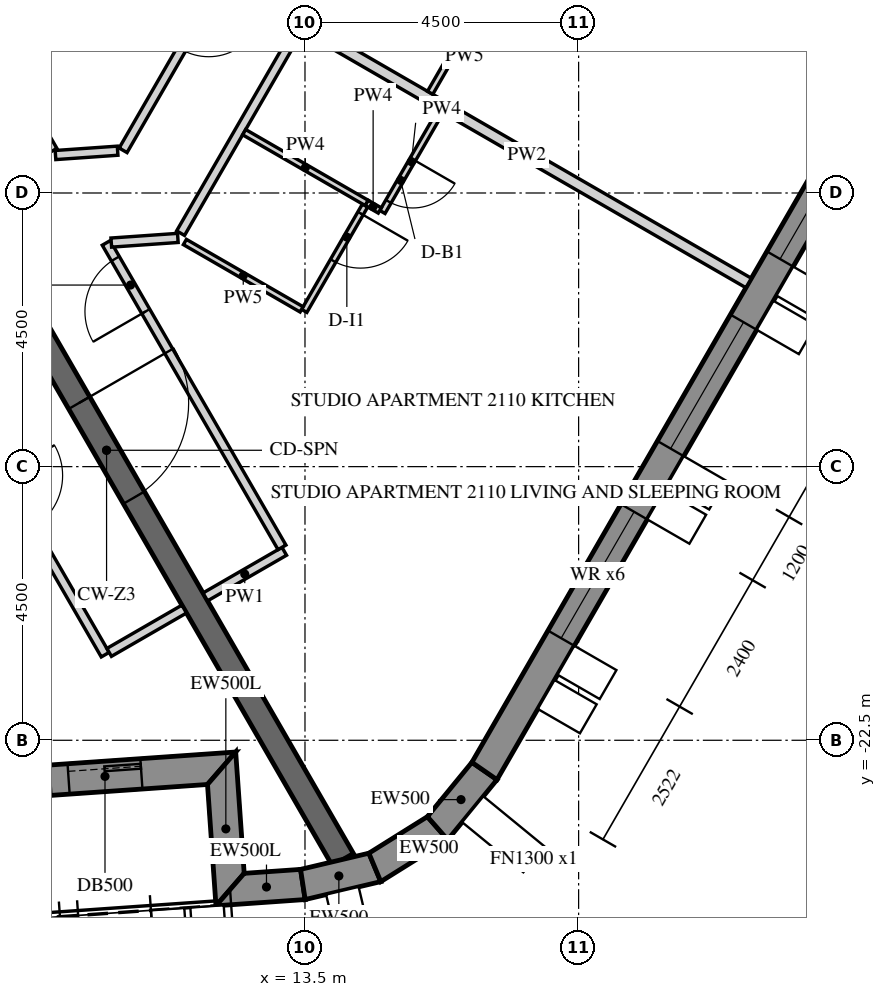
"""IFC4 building model, lengths in metres.
Left out: names, types, materials, properties, quantities, classifications, styles, units other than length and angle.
Written with IfcOpenShell. Run it as: python <this file> out.ifc"""

import sys

from ifc_helpers import new_model, si_unit, direction, frame, frame_2d, origin, place, context, subcontext, project, spatial, polyline, rectangle, outline, extrude, element, fill, save


model = new_model("IFC4")
c1 = context("Model", 3, precision=1e-05, world=origin(), true_north=direction((0.0, 1.0)))
c2 = subcontext(c1, "Body", "Model", "MODEL_VIEW")
j1 = project(units=[si_unit("LENGTHUNIT", "METRE"), si_unit("PLANEANGLEUNIT", "RADIAN")], contexts=[c1])
p1 = place(None, origin())
s1 = spatial("IfcSite", under=j1, at=p1, CompositionType="ELEMENT")
p2 = place(p1, origin())
s2 = spatial("IfcBuilding", under=s1, at=p2, CompositionType="ELEMENT")
p3 = place(p2, frame((0.0, 0.0, 267.9)))
s3 = spatial("IfcBuildingStorey", under=s2, at=p3, CompositionType="ELEMENT", Elevation=267.9)
p4 = place(p3, frame((-10.86, -24.567, -0.15), z_axis=(0.0, 0.0, 1.0), x_axis=(0.997564329317, 0.06975248292, 0.0)))
e1 = element("IfcWall", 1, at=p4, inside=s3, PredefinedType="SOLIDWALL", context=c2, shape_type="SweptSolid", body=[
    extrude(outline(polyline([(0.25, -0.25), (22.795, -0.25), (23.295, 0.25), (-0.25, 0.25), (0.25, -0.25)])), origin(), (0.0, 0.0, 1.0), 3.9),
])
p5 = place(p4, frame((1.323, 0.0, 1.05)))
e2 = element("IfcOpeningElement", 2, at=p5, cuts=e1, PredefinedType="OPENING", context=c2, shape_type="SweptSolid", body=[
    extrude(rectangle(XDim=0.9, YDim=1.5, at=frame_2d((0.45, 0.75))), frame((0.0, 0.26, 0.0), z_axis=(0.0, -1.0, 0.0), x_axis=(1.0, 0.0, 0.0)), (0.0, 0.0, 1.0), 0.52),
])
p6 = place(p4, frame((2.522, 0.0, 0.15)))
e3 = element("IfcOpeningElement", 3, at=p6, cuts=e1, PredefinedType="OPENING", context=c2, shape_type="SweptSolid", body=[
    extrude(rectangle(XDim=1.2, YDim=2.4, at=frame_2d((0.6, 1.2))), frame((0.0, 0.26, 0.0), z_axis=(0.0, -1.0, 0.0), x_axis=(1.0, 0.0, 0.0)), (0.0, 0.0, 1.0), 0.52),
])
p7 = place(p4, frame((4.922, 0.0, 1.05)))
e4 = element("IfcOpeningElement", 4, at=p7, cuts=e1, PredefinedType="OPENING", context=c2, shape_type="SweptSolid", body=[
    extrude(rectangle(XDim=0.9, YDim=1.5, at=frame_2d((0.45, 0.75))), frame((0.0, 0.26, 0.0), z_axis=(0.0, -1.0, 0.0), x_axis=(1.0, 0.0, 0.0)), (0.0, 0.0, 1.0), 0.52),
])
p8 = place(p4, frame((6.122, 0.0, 0.15)))
e5 = element("IfcOpeningElement", 5, at=p8, cuts=e1, PredefinedType="OPENING", context=c2, shape_type="SweptSolid", body=[
    extrude(rectangle(XDim=1.2, YDim=2.4, at=frame_2d((0.6, 1.2))), frame((0.0, 0.26, 0.0), z_axis=(0.0, -1.0, 0.0), x_axis=(1.0, 0.0, 0.0)), (0.0, 0.0, 1.0), 0.52),
])
p9 = place(p4, frame((8.522, 0.0, 1.05)))
e6 = element("IfcOpeningElement", 6, at=p9, cuts=e1, PredefinedType="OPENING", context=c2, shape_type="SweptSolid", body=[
    extrude(rectangle(XDim=0.9, YDim=1.5, at=frame_2d((0.45, 0.75))), frame((0.0, 0.26, 0.0), z_axis=(0.0, -1.0, 0.0), x_axis=(1.0, 0.0, 0.0)), (0.0, 0.0, 1.0), 0.52),
])
p10 = place(p4, frame((9.722, 0.0, 0.15)))
e7 = element("IfcOpeningElement", 7, at=p10, cuts=e1, PredefinedType="OPENING", context=c2, shape_type="SweptSolid", body=[
    extrude(rectangle(XDim=1.2, YDim=2.4, at=frame_2d((0.6, 1.2))), frame((0.0, 0.26, 0.0), z_axis=(0.0, -1.0, 0.0), x_axis=(1.0, 0.0, 0.0)), (0.0, 0.0, 1.0), 0.52),
])
p11 = place(p4, frame((12.122, 0.0, 1.05)))
e8 = element("IfcOpeningElement", 8, at=p11, cuts=e1, PredefinedType="OPENING", context=c2, shape_type="SweptSolid", body=[
    extrude(rectangle(XDim=0.9, YDim=1.5, at=frame_2d((0.45, 0.75))), frame((0.0, 0.26, 0.0), z_axis=(0.0, -1.0, 0.0), x_axis=(1.0, 0.0, 0.0)), (0.0, 0.0, 1.0), 0.52),
])
p12 = place(p4, frame((13.323, 0.0, 0.15)))
e9 = element("IfcOpeningElement", 9, at=p12, cuts=e1, PredefinedType="OPENING", context=c2, shape_type="SweptSolid", body=[
    extrude(rectangle(XDim=1.2, YDim=2.4, at=frame_2d((0.6, 1.2))), frame((0.0, 0.26, 0.0), z_axis=(0.0, -1.0, 0.0), x_axis=(1.0, 0.0, 0.0)), (0.0, 0.0, 1.0), 0.52),
])
p13 = place(p4, frame((15.722, 0.0, 1.05)))
e10 = element("IfcOpeningElement", 10, at=p13, cuts=e1, PredefinedType="OPENING", context=c2, shape_type="SweptSolid", body=[
    extrude(rectangle(XDim=0.9, YDim=1.5, at=frame_2d((0.45, 0.75))), frame((0.0, 0.26, 0.0), z_axis=(0.0, -1.0, 0.0), x_axis=(1.0, 0.0, 0.0)), (0.0, 0.0, 1.0), 0.52),
])
p14 = place(p4, frame((16.922, 0.0, 0.15)))
e11 = element("IfcOpeningElement", 11, at=p14, cuts=e1, PredefinedType="OPENING", context=c2, shape_type="SweptSolid", body=[
    extrude(rectangle(XDim=1.2, YDim=2.4, at=frame_2d((0.6, 1.2))), frame((0.0, 0.26, 0.0), z_axis=(0.0, -1.0, 0.0), x_axis=(1.0, 0.0, 0.0)), (0.0, 0.0, 1.0), 0.52),
])
p15 = place(p4, frame((19.323, 0.0, 1.05)))
e12 = element("IfcOpeningElement", 12, at=p15, cuts=e1, PredefinedType="OPENING", context=c2, shape_type="SweptSolid", body=[
    extrude(rectangle(XDim=0.9, YDim=1.5, at=frame_2d((0.45, 0.75))), frame((0.0, 0.26, 0.0), z_axis=(0.0, -1.0, 0.0), x_axis=(1.0, 0.0, 0.0)), (0.0, 0.0, 1.0), 0.52),
])
p16 = place(p4, frame((20.522, 0.0, 0.15)))
e13 = element("IfcOpeningElement", 13, at=p16, cuts=e1, PredefinedType="OPENING", context=c2, shape_type="SweptSolid", body=[
    extrude(rectangle(XDim=1.2, YDim=2.4, at=frame_2d((0.6, 1.2))), frame((0.0, 0.26, 0.0), z_axis=(0.0, -1.0, 0.0), x_axis=(1.0, 0.0, 0.0)), (0.0, 0.0, 1.0), 0.52),
])
p17 = place(p3, frame((12.129, -22.96, -0.15), z_axis=(0.0, 0.0, 1.0), x_axis=(0.069824268692, -0.99755930726, 0.0)))
e14 = element("IfcWall", 14, at=p17, inside=s3, PredefinedType="SOLIDWALL", context=c2, shape_type="SweptSolid", body=[
    extrude(outline(polyline([(0.25, -0.25), (2.25, -0.25), (1.75, 0.25), (-0.25, 0.25), (0.25, -0.25)])), origin(), (0.0, 0.0, 1.0), 3.9),
])
p18 = place(p3, frame((12.268, -24.955, -0.15), z_axis=(0.0, 0.0, 1.0), x_axis=(0.997561942506, 0.06978660948, 0.0)))
e15 = element("IfcWall", 15, at=p18, inside=s3, PredefinedType="SOLIDWALL", context=c2, shape_type="SweptSolid", body=[
    extrude(outline(polyline([(-0.25, -0.25), (1.22, -0.25), (1.179, 0.25), (0.25, 0.25), (-0.25, -0.25)])), origin(), (0.0, 0.0, 1.0), 3.9),
])
p19 = place(p3, frame((13.465, -24.871, -0.15), z_axis=(0.0, 0.0, 1.0), x_axis=(0.973044740285, 0.230616420501, 0.0)))
e16 = element("IfcWall", 16, at=p19, inside=s3, PredefinedType="SOLIDWALL", context=c2, shape_type="SweptSolid", body=[
    extrude(outline(polyline([(-0.021, -0.25), (1.257, -0.25), (1.175, 0.25), (0.021, 0.25), (-0.021, -0.25)])), origin(), (0.0, 0.0, 1.0), 3.9),
])
p20 = place(p3, frame((14.649, -24.591, -0.15), z_axis=(0.0, 0.0, 1.0), x_axis=(0.848054682072, 0.529908724419, 0.0)))
e17 = element("IfcWall", 17, at=p20, inside=s3, PredefinedType="SOLIDWALL", context=c2, shape_type="SweptSolid", body=[
    extrude(outline(polyline([(-0.041, -0.25), (1.257, -0.25), (1.175, 0.25), (0.041, 0.25), (-0.041, -0.25)])), origin(), (0.0, 0.0, 1.0), 3.9),
])
p21 = place(p3, frame((15.68, -23.946, -0.15), z_axis=(0.0, 0.0, 1.0), x_axis=(0.633805934167, 0.773492105852, 0.0)))
e18 = element("IfcWall", 18, at=p21, inside=s3, PredefinedType="SOLIDWALL", context=c2, shape_type="SweptSolid", body=[
    extrude(outline(polyline([(-0.041, -0.25), (1.237, -0.25), (1.196, 0.25), (0.041, 0.25), (-0.041, -0.25)])), origin(), (0.0, 0.0, 1.0), 3.9),
])
p22 = place(p3, frame((16.451, -23.005, -0.15), z_axis=(0.0, 0.0, 1.0), x_axis=(0.500003737743, 0.866023245787, 0.0)))
e19 = element("IfcWall", 19, at=p22, inside=s3, PredefinedType="SOLIDWALL", context=c2, shape_type="SweptSolid", body=[
    extrude(outline(polyline([(-0.021, -0.25), (25.468, -0.25), (25.421, 0.25), (0.021, 0.25), (-0.021, -0.25)])), origin(), (0.0, 0.0, 1.0), 3.9),
])
p23 = place(p22, frame((2.522, 0.0, 0.75)))
e20 = element("IfcOpeningElement", 20, at=p23, cuts=e19, PredefinedType="OPENING", context=c2, shape_type="SweptSolid", body=[
    extrude(rectangle(XDim=2.4, YDim=2.7, at=frame_2d((1.2, 1.35))), frame((0.0, 0.26, 0.0), z_axis=(0.0, -1.0, 0.0), x_axis=(1.0, 0.0, 0.0)), (0.0, 0.0, 1.0), 0.52),
])
p24 = place(p22, frame((6.122, 0.0, 0.75)))
e21 = element("IfcOpeningElement", 21, at=p24, cuts=e19, PredefinedType="OPENING", context=c2, shape_type="SweptSolid", body=[
    extrude(rectangle(XDim=2.4, YDim=2.7, at=frame_2d((1.2, 1.35))), frame((0.0, 0.26, 0.0), z_axis=(0.0, -1.0, 0.0), x_axis=(1.0, 0.0, 0.0)), (0.0, 0.0, 1.0), 0.52),
])
p25 = place(p22, frame((9.722, 0.0, 0.75)))
e22 = element("IfcOpeningElement", 22, at=p25, cuts=e19, PredefinedType="OPENING", context=c2, shape_type="SweptSolid", body=[
    extrude(rectangle(XDim=2.4, YDim=2.7, at=frame_2d((1.2, 1.35))), frame((0.0, 0.26, 0.0), z_axis=(0.0, -1.0, 0.0), x_axis=(1.0, 0.0, 0.0)), (0.0, 0.0, 1.0), 0.52),
])
p26 = place(p22, frame((13.323, 0.0, 0.75)))
e23 = element("IfcOpeningElement", 23, at=p26, cuts=e19, PredefinedType="OPENING", context=c2, shape_type="SweptSolid", body=[
    extrude(rectangle(XDim=2.4, YDim=2.7, at=frame_2d((1.2, 1.35))), frame((0.0, 0.26, 0.0), z_axis=(0.0, -1.0, 0.0), x_axis=(1.0, 0.0, 0.0)), (0.0, 0.0, 1.0), 0.52),
])
p27 = place(p22, frame((16.922, 0.0, 0.75)))
e24 = element("IfcOpeningElement", 24, at=p27, cuts=e19, PredefinedType="OPENING", context=c2, shape_type="SweptSolid", body=[
    extrude(rectangle(XDim=2.4, YDim=2.7, at=frame_2d((1.2, 1.35))), frame((0.0, 0.26, 0.0), z_axis=(0.0, -1.0, 0.0), x_axis=(1.0, 0.0, 0.0)), (0.0, 0.0, 1.0), 0.52),
])
p28 = place(p22, frame((20.522, 0.0, 0.75)))
e25 = element("IfcOpeningElement", 25, at=p28, cuts=e19, PredefinedType="OPENING", context=c2, shape_type="SweptSolid", body=[
    extrude(rectangle(XDim=2.4, YDim=2.7, at=frame_2d((1.2, 1.35))), frame((0.0, 0.26, 0.0), z_axis=(0.0, -1.0, 0.0), x_axis=(1.0, 0.0, 0.0)), (0.0, 0.0, 1.0), 0.52),
])
p29 = place(p3, frame((6.351, -11.0, -0.15), z_axis=(0.0, 0.0, 1.0), x_axis=(0.499998894578, -0.866026041999, 0.0)))
e26 = element("IfcWall", 26, at=p29, inside=s3, PredefinedType="SHEAR", context=c2, shape_type="SweptSolid", body=[
    extrude(rectangle(XDim=15.544, YDim=0.4, at=frame_2d((7.772, 0.0))), origin(), (0.0, 0.0, 1.0), 3.9),
])
p30 = place(p29, frame((6.872, 0.0, 0.15)))
e27 = element("IfcOpeningElement", 27, at=p30, cuts=e26, PredefinedType="OPENING", context=c2, shape_type="SweptSolid", body=[
    extrude(rectangle(XDim=1.8, YDim=2.4, at=frame_2d((0.9, 1.2))), frame((0.0, 0.21, 0.0), z_axis=(0.0, -1.0, 0.0), x_axis=(1.0, 0.0, 0.0)), (0.0, 0.0, 1.0), 0.42),
])
p31 = place(p3, frame((6.5, -14.657, 0.0), z_axis=(0.0, 0.0, 1.0), x_axis=(0.499966098742, -0.8660449758, 0.0)))
e28 = element("IfcWall", 28, at=p31, inside=s3, PredefinedType="PARTITIONING", context=c2, shape_type="SweptSolid", body=[
    extrude(rectangle(XDim=7.431, YDim=0.15, at=frame_2d((3.715, 0.0))), origin(), (0.0, 0.0, 1.0), 2.988),
])
p32 = place(p31, frame((4.03, 0.0, 0.0)))
e29 = element("IfcOpeningElement", 29, at=p32, cuts=e28, PredefinedType="OPENING", context=c2, shape_type="SweptSolid", body=[
    extrude(rectangle(XDim=1.0, YDim=2.1, at=frame_2d((0.5, 1.05))), frame((0.0, 0.085, 0.0), z_axis=(0.0, -1.0, 0.0), x_axis=(1.0, 0.0, 0.0)), (0.0, 0.0, 1.0), 0.17),
])
p33 = place(p3, frame((10.28, -21.055, 0.0), z_axis=(0.0, 0.0, 1.0), x_axis=(0.866020080793, 0.500009219579, 0.0)))
e30 = element("IfcWall", 30, at=p33, inside=s3, PredefinedType="PARTITIONING", context=c2, shape_type="SweptSolid", body=[
    extrude(rectangle(XDim=1.425, YDim=0.15, at=frame_2d((0.712, 0.0))), origin(), (0.0, 0.0, 1.0), 2.988),
])
p34 = place(p3, frame((11.86, -20.142, 0.0), z_axis=(0.0, 0.0, 1.0), x_axis=(0.866031096941, 0.499990139034, 0.0)))
e31 = element("IfcWall", 31, at=p34, inside=s3, PredefinedType="PARTITIONING", context=c2, shape_type="SweptSolid", body=[
    extrude(rectangle(XDim=1.5, YDim=0.15, at=frame_2d((0.75, 0.0))), origin(), (0.0, 0.0, 1.0), 2.988),
])
p35 = place(p3, frame((13.122, -19.327, 0.0), z_axis=(0.0, 0.0, 1.0), x_axis=(-0.500013707032, 0.866017489881, 0.0)))
e32 = element("IfcWall", 32, at=p35, inside=s3, PredefinedType="PARTITIONING", context=c2, shape_type="SweptSolid", body=[
    extrude(rectangle(XDim=5.781, YDim=0.15, at=frame_2d((2.89, 0.0))), origin(), (0.0, 0.0, 1.0), 2.988),
])
p36 = place(p35, frame((4.481, 0.0, 0.0)))
e33 = element("IfcOpeningElement", 33, at=p36, cuts=e32, PredefinedType="OPENING", context=c2, shape_type="SweptSolid", body=[
    extrude(rectangle(XDim=1.0, YDim=2.1, at=frame_2d((0.5, 1.05))), frame((0.0, 0.085, 0.0), z_axis=(0.0, -1.0, 0.0), x_axis=(1.0, 0.0, 0.0)), (0.0, 0.0, 1.0), 0.17),
])
p37 = place(p3, frame((10.314, -14.315, 0.0), z_axis=(0.0, 0.0, 1.0), x_axis=(0.997557107149, 0.069855693944, 0.0)))
e34 = element("IfcWall", 34, at=p37, inside=s3, PredefinedType="PARTITIONING", context=c2, shape_type="SweptSolid", body=[
    extrude(rectangle(XDim=1.097, YDim=0.15, at=frame_2d((0.549, 0.0))), origin(), (0.0, 0.0, 1.0), 2.988),
])
p38 = place(p3, frame((11.454, -14.16, 0.0), z_axis=(0.0, 0.0, 1.0), x_axis=(0.500000296604, 0.86602523254, 0.0)))
e35 = element("IfcWall", 35, at=p38, inside=s3, PredefinedType="PARTITIONING", context=c2, shape_type="SweptSolid", body=[
    extrude(rectangle(XDim=14.934, YDim=0.15, at=frame_2d((7.467, 0.0))), origin(), (0.0, 0.0, 1.0), 2.988),
])
p39 = place(p38, frame((7.261, 0.0, 0.0)))
e36 = element("IfcOpeningElement", 36, at=p39, cuts=e35, PredefinedType="OPENING", context=c2, shape_type="SweptSolid", body=[
    extrude(rectangle(XDim=1.0, YDim=2.1, at=frame_2d((0.5, 1.05))), frame((0.0, 0.085, 0.0), z_axis=(0.0, -1.0, 0.0), x_axis=(1.0, 0.0, 0.0)), (0.0, 0.0, 1.0), 0.17),
])
p40 = place(p38, frame((13.784, 0.0, 0.0)))
e37 = element("IfcOpeningElement", 37, at=p40, cuts=e35, PredefinedType="OPENING", context=c2, shape_type="SweptSolid", body=[
    extrude(rectangle(XDim=1.0, YDim=2.1, at=frame_2d((0.5, 1.05))), frame((0.0, 0.085, 0.0), z_axis=(0.0, -1.0, 0.0), x_axis=(1.0, 0.0, 0.0)), (0.0, 0.0, 1.0), 0.17),
])
p41 = place(p3, frame((12.875, -8.699, 0.0), z_axis=(0.0, 0.0, 1.0), x_axis=(-0.49999482868, -0.866028389427, 0.0)))
e38 = element("IfcWall", 38, at=p41, inside=s3, PredefinedType="PARTITIONING", context=c2, shape_type="SweptSolid", body=[
    extrude(rectangle(XDim=4.733, YDim=0.15, at=frame_2d((2.366, 0.0))), origin(), (0.0, 0.0, 1.0), 2.988),
])
p42 = place(p41, frame((1.917, 0.0, 0.0)))
e39 = element("IfcOpeningElement", 39, at=p42, cuts=e38, PredefinedType="OPENING", context=c2, shape_type="SweptSolid", body=[
    extrude(rectangle(XDim=0.9, YDim=2.1, at=frame_2d((0.45, 1.05))), frame((0.0, 0.085, 0.0), z_axis=(0.0, -1.0, 0.0), x_axis=(1.0, 0.0, 0.0)), (0.0, 0.0, 1.0), 0.17),
])
p43 = place(p3, frame((10.419, -12.804, 0.0), z_axis=(0.0, 0.0, 1.0), x_axis=(-0.997558136861, -0.069840987838, 0.0)))
e40 = element("IfcWall", 40, at=p43, inside=s3, PredefinedType="PARTITIONING", context=c2, shape_type="SweptSolid", body=[
    extrude(rectangle(XDim=1.024, YDim=0.15, at=frame_2d((0.512, 0.0))), origin(), (0.0, 0.0, 1.0), 2.988),
])
p44 = place(p3, frame((9.355, -12.804, 0.0), z_axis=(0.0, 0.0, 1.0), x_axis=(-0.499998034377, 0.866026538634, 0.0)))
e41 = element("IfcWall", 41, at=p44, inside=s3, PredefinedType="PARTITIONING", context=c2, shape_type="SweptSolid", body=[
    extrude(rectangle(XDim=0.946, YDim=0.15, at=frame_2d((0.473, 0.0))), origin(), (0.0, 0.0, 1.0), 2.988),
])
p45 = place(p3, frame((15.728, -12.158, 0.0), z_axis=(0.0, 0.0, 1.0), x_axis=(-0.499947453424, -0.866055739439, 0.0)))
e42 = element("IfcWall", 42, at=p45, inside=s3, PredefinedType="PARTITIONING", context=c2, shape_type="SweptSolid", body=[
    extrude(rectangle(XDim=1.91, YDim=0.1, at=frame_2d((0.955, 0.0))), origin(), (0.0, 0.0, 1.0), 2.988),
])
p46 = place(p45, frame((0.91, 0.0, 0.0)))
e43 = element("IfcOpeningElement", 43, at=p46, cuts=e42, PredefinedType="OPENING", context=c2, shape_type="SweptSolid", body=[
    extrude(rectangle(XDim=0.8, YDim=2.1, at=frame_2d((0.4, 1.05))), frame((0.0, 0.06, 0.0), z_axis=(0.0, -1.0, 0.0), x_axis=(1.0, 0.0, 0.0)), (0.0, 0.0, 1.0), 0.12),
])
p47 = place(p3, frame((14.73, -13.787, 0.0), z_axis=(0.0, 0.0, 1.0), x_axis=(-0.865669265636, 0.500616342655, 0.0)))
e44 = element("IfcWall", 44, at=p47, inside=s3, PredefinedType="PARTITIONING", context=c2, shape_type="SweptSolid", body=[
    extrude(rectangle(XDim=0.252, YDim=0.1, at=frame_2d((0.126, 0.0))), origin(), (0.0, 0.0, 1.0), 2.988),
])
p48 = place(p3, frame((14.488, -13.706, 0.0), z_axis=(0.0, 0.0, 1.0), x_axis=(-0.500035721725, -0.866004778855, 0.0)))
e45 = element("IfcWall", 45, at=p48, inside=s3, PredefinedType="PARTITIONING", context=c2, shape_type="SweptSolid", body=[
    extrude(rectangle(XDim=2.001, YDim=0.1, at=frame_2d((1.0, 0.0))), origin(), (0.0, 0.0, 1.0), 2.988),
])
p49 = place(p48, frame((0.15, 0.0, 0.0)))
e46 = element("IfcOpeningElement", 46, at=p49, cuts=e45, PredefinedType="OPENING", context=c2, shape_type="SweptSolid", body=[
    extrude(rectangle(XDim=0.9, YDim=2.1, at=frame_2d((0.45, 1.05))), frame((0.0, 0.06, 0.0), z_axis=(0.0, -1.0, 0.0), x_axis=(1.0, 0.0, 0.0)), (0.0, 0.0, 1.0), 0.12),
])
p50 = place(p3, frame((13.444, -15.414, 0.0), z_axis=(0.0, 0.0, 1.0), x_axis=(-0.866024121142, 0.500002221596, 0.0)))
e47 = element("IfcWall", 47, at=p50, inside=s3, PredefinedType="PARTITIONING", context=c2, shape_type="SweptSolid", body=[
    extrude(rectangle(XDim=2.216, YDim=0.1, at=frame_2d((1.108, 0.0))), origin(), (0.0, 0.0, 1.0), 2.988),
])
p51 = place(p3, frame((20.796, -14.98, 0.0), z_axis=(0.0, 0.0, 1.0), x_axis=(-0.866021515814, 0.500006734102, 0.0)))
e48 = element("IfcWall", 48, at=p51, inside=s3, PredefinedType="PARTITIONING", context=c2, shape_type="SweptSolid", body=[
    extrude(rectangle(XDim=8.425, YDim=0.18, at=frame_2d((4.213, 0.0))), origin(), (0.0, 0.0, 1.0), 2.988),
])
p52 = place(p3, frame((12.5, -12.5, 0.0), z_axis=(0.0, 0.0, 1.0), x_axis=(0.865998469481, -0.500046648681, 0.0)))
e49 = element("IfcWall", 49, at=p52, inside=s3, PredefinedType="PARTITIONING", context=c2, shape_type="SweptSolid", body=[
    extrude(rectangle(XDim=2.325, YDim=0.1, at=frame_2d((1.163, 0.0))), origin(), (0.0, 0.0, 1.0), 2.988),
])
p53 = place(p3, frame((16.688, -9.895, 0.0), z_axis=(0.0, 0.0, 1.0), x_axis=(-0.49995000081, -0.866054268906, 0.0)))
e50 = element("IfcWall", 50, at=p53, inside=s3, PredefinedType="PARTITIONING", context=c2, shape_type="SweptSolid", body=[
    extrude(rectangle(XDim=2.26, YDim=0.1, at=frame_2d((1.13, 0.0))), origin(), (0.0, 0.0, 1.0), 2.988),
])
p54 = place(p16, frame((0.0, 0.175, 0.0)))
e51 = element("IfcDoor", 51, at=p54, inside=s3, OperationType="SLIDING_TO_LEFT", PredefinedType="DOOR", context=c2, shape_type="SweptSolid", body=[
    extrude(rectangle(XDim=1.2, YDim=2.4, at=frame_2d((0.6, 1.2))), frame((0.0, 0.025, 0.0), z_axis=(0.0, -1.0, 0.0), x_axis=(1.0, 0.0, 0.0)), (0.0, 0.0, 1.0), 0.05),
])
fill(e13, e51)
p55 = place(p23, frame((0.0, 0.18, 0.0)))
e52 = element("IfcWindow", 52, at=p55, inside=s3, PartitioningType="DOUBLE_PANEL_VERTICAL", PredefinedType="WINDOW", context=c2, shape_type="SweptSolid", body=[
    extrude(rectangle(XDim=2.4, YDim=2.7, at=frame_2d((1.2, 1.35))), frame((0.0, 0.03, 0.0), z_axis=(0.0, -1.0, 0.0), x_axis=(1.0, 0.0, 0.0)), (0.0, 0.0, 1.0), 0.06),
])
fill(e20, e52)
p56 = place(p24, frame((0.0, 0.18, 0.0)))
e53 = element("IfcWindow", 53, at=p56, inside=s3, PartitioningType="DOUBLE_PANEL_VERTICAL", PredefinedType="WINDOW", context=c2, shape_type="SweptSolid", body=[
    extrude(rectangle(XDim=2.4, YDim=2.7, at=frame_2d((1.2, 1.35))), frame((0.0, 0.03, 0.0), z_axis=(0.0, -1.0, 0.0), x_axis=(1.0, 0.0, 0.0)), (0.0, 0.0, 1.0), 0.06),
])
fill(e21, e53)
p57 = place(p25, frame((0.0, 0.18, 0.0)))
e54 = element("IfcWindow", 54, at=p57, inside=s3, PartitioningType="DOUBLE_PANEL_VERTICAL", PredefinedType="WINDOW", context=c2, shape_type="SweptSolid", body=[
    extrude(rectangle(XDim=2.4, YDim=2.7, at=frame_2d((1.2, 1.35))), frame((0.0, 0.03, 0.0), z_axis=(0.0, -1.0, 0.0), x_axis=(1.0, 0.0, 0.0)), (0.0, 0.0, 1.0), 0.06),
])
fill(e22, e54)
p58 = place(p30, origin())
e55 = element("IfcDoor", 55, at=p58, inside=s3, OperationType="DOUBLE_DOOR_SINGLE_SWING", PredefinedType="DOOR", context=c2, shape_type="SweptSolid", body=[
    extrude(rectangle(XDim=1.8, YDim=2.4, at=frame_2d((0.9, 1.2))), frame((0.0, 0.025, 0.0), z_axis=(0.0, -1.0, 0.0), x_axis=(1.0, 0.0, 0.0)), (0.0, 0.0, 1.0), 0.05),
])
fill(e27, e55)
p59 = place(p36, origin())
e56 = element("IfcDoor", 56, at=p59, inside=s3, OperationType="SINGLE_SWING_LEFT", PredefinedType="DOOR", context=c2, shape_type="SweptSolid", body=[
    extrude(rectangle(XDim=1.0, YDim=2.1, at=frame_2d((0.5, 1.05))), frame((0.0, 0.025, 0.0), z_axis=(0.0, -1.0, 0.0), x_axis=(1.0, 0.0, 0.0)), (0.0, 0.0, 1.0), 0.05),
])
fill(e33, e56)
p60 = place(p46, origin())
e57 = element("IfcDoor", 57, at=p60, inside=s3, OperationType="SINGLE_SWING_LEFT", PredefinedType="DOOR", context=c2, shape_type="SweptSolid", body=[
    extrude(rectangle(XDim=0.8, YDim=2.1, at=frame_2d((0.4, 1.05))), frame((0.0, 0.025, 0.0), z_axis=(0.0, -1.0, 0.0), x_axis=(1.0, 0.0, 0.0)), (0.0, 0.0, 1.0), 0.05),
])
fill(e43, e57)
p61 = place(p49, origin())
e58 = element("IfcDoor", 58, at=p61, inside=s3, OperationType="SINGLE_SWING_RIGHT", PredefinedType="DOOR", context=c2, shape_type="SweptSolid", body=[
    extrude(rectangle(XDim=0.9, YDim=2.1, at=frame_2d((0.45, 1.05))), frame((0.0, 0.025, 0.0), z_axis=(0.0, -1.0, 0.0), x_axis=(1.0, 0.0, 0.0)), (0.0, 0.0, 1.0), 0.05),
])
fill(e46, e58)
save(model, sys.argv[1])
